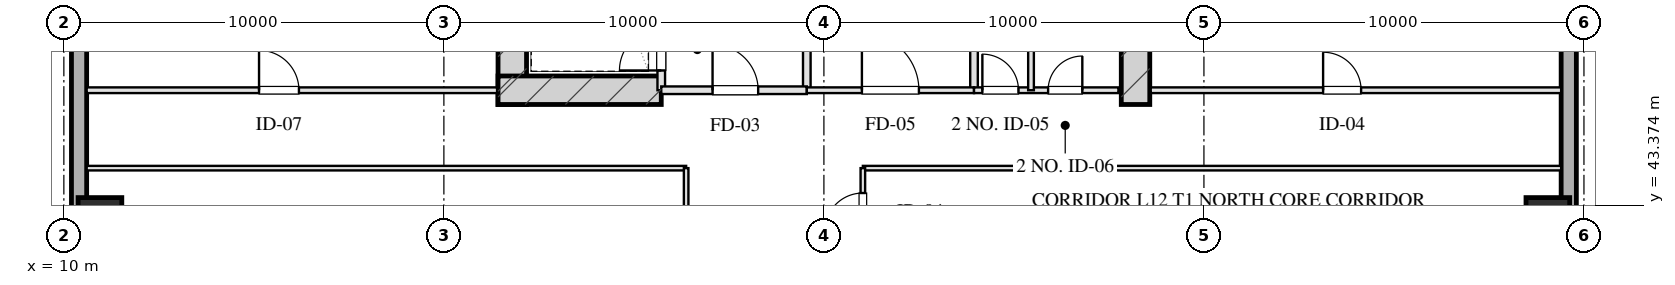
"""IFC4 building model, lengths in metres.
Left out: names, types, materials, properties, quantities, classifications, styles, units other than length and angle.
Written with IfcOpenShell. Run it as: python <this file> out.ifc"""

import sys

from ifc_helpers import new_model, si_unit, direction, frame, frame_2d, origin, origin_2d, place, context, subcontext, project, spatial, rectangle, hollow_rectangle, extrude, element, fill, save


model = new_model("IFC4")
c1 = context("Model", 3, precision=1e-05, world=origin(), true_north=direction((0.0, 1.0)))
c2 = subcontext(c1, "Body", "Model", "MODEL_VIEW")
j1 = project(units=[si_unit("LENGTHUNIT", "METRE"), si_unit("PLANEANGLEUNIT", "RADIAN")], contexts=[c1])
p1 = place(None, origin())
s1 = spatial("IfcSite", under=j1, at=p1, CompositionType="ELEMENT")
p2 = place(p1, origin())
s2 = spatial("IfcBuilding", under=s1, at=p2, CompositionType="ELEMENT")
p3 = place(p2, frame((0.0, 0.0, 54.05)))
s3 = spatial("IfcBuildingStorey", under=s2, at=p3, CompositionType="ELEMENT", Elevation=54.05)
for number, where, z_axis, x_axis in (
    (1, (21.8, 46.025, 0.0), (0.0, 0.0, 1.0), (0.0, 1.0, 0.0)),
    (2, (38.2, 46.025, 0.0), (0.0, 0.0, 1.0), (0.0, 1.0, 0.0)),
):
    element("IfcWall", number, at=place(p3, frame(where, z_axis=z_axis, x_axis=x_axis)), inside=s3, PredefinedType="SHEAR", context=c2, shape_type="SweptSolid", body=[
        extrude(rectangle(XDim=9.63, YDim=0.75, at=frame_2d((4.815, 0.0))), origin(), (0.0, 0.0, 1.0), 3.45),
    ])
p4 = place(p3, frame((21.425, 46.4, 0.0), z_axis=(0.0, 0.0, 1.0), x_axis=(1.0, 0.0, 0.0)))
e3 = element("IfcWall", 3, at=p4, inside=s3, PredefinedType="SHEAR", context=c2, shape_type="SweptSolid", body=[
    extrude(rectangle(XDim=4.295, YDim=0.75, at=frame_2d((2.147, 0.0))), origin(), (0.0, 0.0, 1.0), 3.45),
])
for number, where, z_axis, x_axis in (
    (4, (10.95, 43.0, 0.0), (0.0, 0.0, 1.0), (1.0, 0.0, 0.0)),
    (5, (49.05, 43.0, 0.0), (0.0, 0.0, 1.0), (1.0, 0.0, 0.0)),
):
    element("IfcColumn", number, at=place(p3, frame(where, z_axis=z_axis, x_axis=x_axis)), inside=s3, PredefinedType="COLUMN", context=c2, shape_type="SweptSolid", body=[
        extrude(hollow_rectangle(XDim=1.15, YDim=1.15, WallThickness=0.04, at=origin_2d()), origin(), (0.0, 0.0, 1.0), 3.451),
    ])
p5 = place(p3, frame((10.4, 7.2, 0.0), z_axis=(0.0, 0.0, 1.0), x_axis=(0.0, 1.0, 0.0)))
e6 = element("IfcWall", 6, at=p5, inside=s3, PredefinedType="SOLIDWALL", context=c2, shape_type="SweptSolid", body=[
    extrude(rectangle(XDim=53.6, YDim=0.4, at=frame_2d((26.8, 0.0))), origin(), (0.0, 0.0, 1.0), 2.61),
])
p6 = place(p5, frame((19.15, 0.0, 0.75)))
e7 = element("IfcOpeningElement", 7, at=p6, cuts=e6, PredefinedType="OPENING", context=c2, shape_type="SweptSolid", body=[
    extrude(rectangle(XDim=2.5, YDim=1.46, at=frame_2d((1.25, 0.73))), frame((0.0, 0.21, 0.0), z_axis=(0.0, -1.0, 0.0), x_axis=(1.0, 0.0, 0.0)), (0.0, 0.0, 1.0), 0.42),
])
p7 = place(p5, frame((22.95, 0.0, 0.75)))
e8 = element("IfcOpeningElement", 8, at=p7, cuts=e6, PredefinedType="OPENING", context=c2, shape_type="SweptSolid", body=[
    extrude(rectangle(XDim=2.5, YDim=1.46, at=frame_2d((1.25, 0.73))), frame((0.0, 0.21, 0.0), z_axis=(0.0, -1.0, 0.0), x_axis=(1.0, 0.0, 0.0)), (0.0, 0.0, 1.0), 0.42),
])
p8 = place(p5, frame((31.95, 0.0, 0.75)))
e9 = element("IfcOpeningElement", 9, at=p8, cuts=e6, PredefinedType="OPENING", context=c2, shape_type="SweptSolid", body=[
    extrude(rectangle(XDim=2.5, YDim=1.46, at=frame_2d((1.25, 0.73))), frame((0.0, 0.21, 0.0), z_axis=(0.0, -1.0, 0.0), x_axis=(1.0, 0.0, 0.0)), (0.0, 0.0, 1.0), 0.42),
])
p9 = place(p3, frame((49.6, 60.8, 0.0), z_axis=(0.0, 0.0, 1.0), x_axis=(0.0, -1.0, 0.0)))
e10 = element("IfcWall", 10, at=p9, inside=s3, PredefinedType="SOLIDWALL", context=c2, shape_type="SweptSolid", body=[
    extrude(rectangle(XDim=53.6, YDim=0.4, at=frame_2d((26.8, 0.0))), origin(), (0.0, 0.0, 1.0), 2.61),
])
p10 = place(p3, frame((25.72, 46.4, 0.0), z_axis=(0.0, 0.0, 1.0), x_axis=(0.0, 1.0, 0.0)))
e11 = element("IfcWall", 11, at=p10, inside=s3, PredefinedType="PARTITIONING", context=c2, shape_type="SweptSolid", body=[
    extrude(rectangle(XDim=1.9, YDim=0.2, at=frame_2d((0.95, 0.0))), origin(), (0.0, 0.0, 1.0), 3.175),
])
p11 = place(p10, frame((0.52, 0.0, 0.0)))
e12 = element("IfcOpeningElement", 12, at=p11, cuts=e11, PredefinedType="OPENING", context=c2, shape_type="SweptSolid", body=[
    extrude(rectangle(XDim=1.1, YDim=2.05, at=frame_2d((0.55, 1.025))), frame((0.0, 0.11, 0.0), z_axis=(0.0, -1.0, 0.0), x_axis=(1.0, 0.0, 0.0)), (0.0, 0.0, 1.0), 0.22),
])
p12 = place(p3, frame((29.55, 46.4, 0.0), z_axis=(0.0, 0.0, 1.0), x_axis=(0.0, 1.0, 0.0)))
e13 = element("IfcWall", 13, at=p12, inside=s3, PredefinedType="PARTITIONING", context=c2, shape_type="SweptSolid", body=[
    extrude(rectangle(XDim=8.43, YDim=0.2, at=frame_2d((4.215, 0.0))), origin(), (0.0, 0.0, 1.0), 3.175),
])
p13 = place(p3, frame((25.72, 46.4, 0.0), z_axis=(0.0, 0.0, 1.0), x_axis=(1.0, 0.0, 0.0)))
e14 = element("IfcWall", 14, at=p13, inside=s3, PredefinedType="PARTITIONING", context=c2, shape_type="SweptSolid", body=[
    extrude(rectangle(XDim=3.83, YDim=0.2, at=frame_2d((1.915, 0.0))), origin(), (0.0, 0.0, 1.0), 3.175),
])
p14 = place(p13, frame((1.35, 0.0, 0.0)))
e15 = element("IfcOpeningElement", 15, at=p14, cuts=e14, PredefinedType="OPENING", context=c2, shape_type="SweptSolid", body=[
    extrude(rectangle(XDim=1.2, YDim=2.05, at=frame_2d((0.6, 1.025))), frame((0.0, 0.11, 0.0), z_axis=(0.0, -1.0, 0.0), x_axis=(1.0, 0.0, 0.0)), (0.0, 0.0, 1.0), 0.22),
])
p15 = place(p3, frame((33.95, 46.4, 0.0), z_axis=(0.0, 0.0, 1.0), x_axis=(0.0, 1.0, 0.0)))
e16 = element("IfcWall", 16, at=p15, inside=s3, PredefinedType="PARTITIONING", context=c2, shape_type="SweptSolid", body=[
    extrude(rectangle(XDim=8.43, YDim=0.2, at=frame_2d((4.215, 0.0))), origin(), (0.0, 0.0, 1.0), 3.175),
])
p16 = place(p3, frame((29.55, 46.4, 0.0), z_axis=(0.0, 0.0, 1.0), x_axis=(1.0, 0.0, 0.0)))
e17 = element("IfcWall", 17, at=p16, inside=s3, PredefinedType="PARTITIONING", context=c2, shape_type="SweptSolid", body=[
    extrude(rectangle(XDim=4.4, YDim=0.15, at=frame_2d((2.2, 0.0))), origin(), (0.0, 0.0, 1.0), 3.175),
])
p17 = place(p16, frame((1.45, 0.0, 0.0)))
e18 = element("IfcOpeningElement", 18, at=p17, cuts=e17, PredefinedType="OPENING", context=c2, shape_type="SweptSolid", body=[
    extrude(rectangle(XDim=1.5, YDim=2.05, at=frame_2d((0.75, 1.025))), frame((0.0, 0.085, 0.0), z_axis=(0.0, -1.0, 0.0), x_axis=(1.0, 0.0, 0.0)), (0.0, 0.0, 1.0), 0.17),
])
p18 = place(p3, frame((33.95, 46.4, 0.0), z_axis=(0.0, 0.0, 1.0), x_axis=(1.0, 0.0, 0.0)))
e19 = element("IfcWall", 19, at=p18, inside=s3, PredefinedType="PARTITIONING", context=c2, shape_type="SweptSolid", body=[
    extrude(rectangle(XDim=3.8, YDim=0.15, at=frame_2d((1.9, 0.0))), origin(), (0.0, 0.0, 1.0), 3.175),
])
p19 = place(p18, frame((0.22, 0.0, 0.0)))
e20 = element("IfcOpeningElement", 20, at=p19, cuts=e19, PredefinedType="OPENING", context=c2, shape_type="SweptSolid", body=[
    extrude(rectangle(XDim=0.95, YDim=2.05, at=frame_2d((0.475, 1.025))), frame((0.0, 0.085, 0.0), z_axis=(0.0, -1.0, 0.0), x_axis=(1.0, 0.0, 0.0)), (0.0, 0.0, 1.0), 0.17),
])
p20 = place(p18, frame((1.95, 0.0, 0.0)))
e21 = element("IfcOpeningElement", 21, at=p20, cuts=e19, PredefinedType="OPENING", context=c2, shape_type="SweptSolid", body=[
    extrude(rectangle(XDim=0.9, YDim=2.05, at=frame_2d((0.45, 1.025))), frame((0.0, 0.085, 0.0), z_axis=(0.0, -1.0, 0.0), x_axis=(1.0, 0.0, 0.0)), (0.0, 0.0, 1.0), 0.17),
])
p21 = place(p3, frame((35.45, 46.4, 0.0), z_axis=(0.0, 0.0, 1.0), x_axis=(0.0, 1.0, 0.0)))
e22 = element("IfcWall", 22, at=p21, inside=s3, PredefinedType="PARTITIONING", context=c2, shape_type="SweptSolid", body=[
    extrude(rectangle(XDim=8.43, YDim=0.15, at=frame_2d((4.215, 0.0))), origin(), (0.0, 0.0, 1.0), 2.765),
])
p22 = place(p21, frame((2.55, 0.0, 0.0)))
e23 = element("IfcOpeningElement", 23, at=p22, cuts=e22, PredefinedType="OPENING", context=c2, shape_type="SweptSolid", body=[
    extrude(rectangle(XDim=0.95, YDim=2.05, at=frame_2d((0.475, 1.025))), frame((0.0, 0.085, 0.0), z_axis=(0.0, -1.0, 0.0), x_axis=(1.0, 0.0, 0.0)), (0.0, 0.0, 1.0), 0.17),
])
p23 = place(p21, frame((5.6, 0.0, 0.0)))
e24 = element("IfcOpeningElement", 24, at=p23, cuts=e22, PredefinedType="OPENING", context=c2, shape_type="SweptSolid", body=[
    extrude(rectangle(XDim=0.9, YDim=2.05, at=frame_2d((0.45, 1.025))), frame((0.0, 0.085, 0.0), z_axis=(0.0, -1.0, 0.0), x_axis=(1.0, 0.0, 0.0)), (0.0, 0.0, 1.0), 0.17),
])
p24 = place(p3, frame((10.6, 46.4, 0.0), z_axis=(0.0, 0.0, 1.0), x_axis=(1.0, 0.0, 0.0)))
e25 = element("IfcWall", 25, at=p24, inside=s3, PredefinedType="PARTITIONING", context=c2, shape_type="SweptSolid", body=[
    extrude(rectangle(XDim=10.8, YDim=0.15, at=frame_2d((5.4, 0.0))), origin(), (0.0, 0.0, 1.0), 3.175),
])
p25 = place(p24, frame((4.536, 0.0, 0.0)))
e26 = element("IfcOpeningElement", 26, at=p25, cuts=e25, PredefinedType="OPENING", context=c2, shape_type="SweptSolid", body=[
    extrude(rectangle(XDim=1.05, YDim=2.05, at=frame_2d((0.525, 1.025))), frame((0.0, 0.085, 0.0), z_axis=(0.0, -1.0, 0.0), x_axis=(1.0, 0.0, 0.0)), (0.0, 0.0, 1.0), 0.17),
])
p26 = place(p3, frame((38.6, 46.4, 0.0), z_axis=(0.0, 0.0, 1.0), x_axis=(1.0, 0.0, 0.0)))
e27 = element("IfcWall", 27, at=p26, inside=s3, PredefinedType="PARTITIONING", context=c2, shape_type="SweptSolid", body=[
    extrude(rectangle(XDim=10.8, YDim=0.15, at=frame_2d((5.4, 0.0))), origin(), (0.0, 0.0, 1.0), 3.175),
])
p27 = place(p26, frame((4.536, 0.0, 0.0)))
e28 = element("IfcOpeningElement", 28, at=p27, cuts=e27, PredefinedType="OPENING", context=c2, shape_type="SweptSolid", body=[
    extrude(rectangle(XDim=1.0, YDim=2.05, at=frame_2d((0.5, 1.025))), frame((0.0, 0.085, 0.0), z_axis=(0.0, -1.0, 0.0), x_axis=(1.0, 0.0, 0.0)), (0.0, 0.0, 1.0), 0.17),
])
p28 = place(p3, frame((10.6, 44.35, 0.0), z_axis=(0.0, 0.0, 1.0), x_axis=(1.0, 0.0, 0.0)))
e29 = element("IfcWall", 29, at=p28, inside=s3, PredefinedType="PARTITIONING", context=c2, shape_type="SweptSolid", body=[
    extrude(rectangle(XDim=15.775, YDim=0.12, at=frame_2d((7.887, 0.0))), origin(), (0.0, 0.0, 1.0), 3.175),
])
p29 = place(p3, frame((31.025, 44.35, 0.0), z_axis=(0.0, 0.0, 1.0), x_axis=(1.0, 0.0, 0.0)))
e30 = element("IfcWall", 30, at=p29, inside=s3, PredefinedType="PARTITIONING", context=c2, shape_type="SweptSolid", body=[
    extrude(rectangle(XDim=18.375, YDim=0.12, at=frame_2d((9.188, 0.0))), origin(), (0.0, 0.0, 1.0), 3.175),
])
p30 = place(p3, frame((26.375, 23.65, 0.0), z_axis=(0.0, 0.0, 1.0), x_axis=(0.0, 1.0, 0.0)))
e31 = element("IfcWall", 31, at=p30, inside=s3, PredefinedType="PARTITIONING", context=c2, shape_type="SweptSolid", body=[
    extrude(rectangle(XDim=20.7, YDim=0.12, at=frame_2d((10.35, 0.0))), origin(), (0.0, 0.0, 1.0), 3.175),
])
p31 = place(p30, frame((2.518, 0.0, 0.0)))
e32 = element("IfcOpeningElement", 32, at=p31, cuts=e31, PredefinedType="OPENING", context=c2, shape_type="SweptSolid", body=[
    extrude(rectangle(XDim=0.85, YDim=2.05, at=frame_2d((0.425, 1.025))), frame((0.0, 0.07, 0.0), z_axis=(0.0, -1.0, 0.0), x_axis=(1.0, 0.0, 0.0)), (0.0, 0.0, 1.0), 0.14),
])
p32 = place(p30, frame((9.692, 0.0, 0.0)))
e33 = element("IfcOpeningElement", 33, at=p32, cuts=e31, PredefinedType="OPENING", context=c2, shape_type="SweptSolid", body=[
    extrude(rectangle(XDim=1.0, YDim=2.05, at=frame_2d((0.5, 1.025))), frame((0.0, 0.07, 0.0), z_axis=(0.0, -1.0, 0.0), x_axis=(1.0, 0.0, 0.0)), (0.0, 0.0, 1.0), 0.14),
])
p33 = place(p30, frame((17.025, 0.0, 0.0)))
e34 = element("IfcOpeningElement", 34, at=p33, cuts=e31, PredefinedType="OPENING", context=c2, shape_type="SweptSolid", body=[
    extrude(rectangle(XDim=1.0, YDim=2.05, at=frame_2d((0.5, 1.025))), frame((0.0, 0.07, 0.0), z_axis=(0.0, -1.0, 0.0), x_axis=(1.0, 0.0, 0.0)), (0.0, 0.0, 1.0), 0.14),
])
p34 = place(p3, frame((31.025, 23.65, 0.0), z_axis=(0.0, 0.0, 1.0), x_axis=(0.0, 1.0, 0.0)))
e35 = element("IfcWall", 35, at=p34, inside=s3, PredefinedType="PARTITIONING", context=c2, shape_type="SweptSolid", body=[
    extrude(rectangle(XDim=20.7, YDim=0.12, at=frame_2d((10.35, 0.0))), origin(), (0.0, 0.0, 1.0), 3.175),
])
p35 = place(p34, frame((0.775, 0.0, 0.0)))
e36 = element("IfcOpeningElement", 36, at=p35, cuts=e35, PredefinedType="OPENING", context=c2, shape_type="SweptSolid", body=[
    extrude(rectangle(XDim=1.0, YDim=2.05, at=frame_2d((0.5, 1.025))), frame((0.0, 0.07, 0.0), z_axis=(0.0, -1.0, 0.0), x_axis=(1.0, 0.0, 0.0)), (0.0, 0.0, 1.0), 0.14),
])
p36 = place(p34, frame((3.95, 0.0, 0.0)))
e37 = element("IfcOpeningElement", 37, at=p36, cuts=e35, PredefinedType="OPENING", context=c2, shape_type="SweptSolid", body=[
    extrude(rectangle(XDim=1.0, YDim=2.05, at=frame_2d((0.5, 1.025))), frame((0.0, 0.07, 0.0), z_axis=(0.0, -1.0, 0.0), x_axis=(1.0, 0.0, 0.0)), (0.0, 0.0, 1.0), 0.14),
])
p37 = place(p34, frame((8.455, 0.0, 0.0)))
e38 = element("IfcOpeningElement", 38, at=p37, cuts=e35, PredefinedType="OPENING", context=c2, shape_type="SweptSolid", body=[
    extrude(rectangle(XDim=1.05, YDim=2.05, at=frame_2d((0.525, 1.025))), frame((0.0, 0.07, 0.0), z_axis=(0.0, -1.0, 0.0), x_axis=(1.0, 0.0, 0.0)), (0.0, 0.0, 1.0), 0.14),
])
p38 = place(p34, frame((12.923, 0.0, 0.0)))
e39 = element("IfcOpeningElement", 39, at=p38, cuts=e35, PredefinedType="OPENING", context=c2, shape_type="SweptSolid", body=[
    extrude(rectangle(XDim=1.0, YDim=2.05, at=frame_2d((0.5, 1.025))), frame((0.0, 0.07, 0.0), z_axis=(0.0, -1.0, 0.0), x_axis=(1.0, 0.0, 0.0)), (0.0, 0.0, 1.0), 0.14),
])
p39 = place(p34, frame((16.338, 0.0, 0.0)))
e40 = element("IfcOpeningElement", 40, at=p39, cuts=e35, PredefinedType="OPENING", context=c2, shape_type="SweptSolid", body=[
    extrude(rectangle(XDim=1.0, YDim=2.05, at=frame_2d((0.5, 1.025))), frame((0.0, 0.07, 0.0), z_axis=(0.0, -1.0, 0.0), x_axis=(1.0, 0.0, 0.0)), (0.0, 0.0, 1.0), 0.14),
])
p40 = place(p34, frame((19.045, 0.0, 0.0)))
e41 = element("IfcOpeningElement", 41, at=p40, cuts=e35, PredefinedType="OPENING", context=c2, shape_type="SweptSolid", body=[
    extrude(rectangle(XDim=1.0, YDim=2.05, at=frame_2d((0.5, 1.025))), frame((0.0, 0.07, 0.0), z_axis=(0.0, -1.0, 0.0), x_axis=(1.0, 0.0, 0.0)), (0.0, 0.0, 1.0), 0.14),
])
p41 = place(p11, origin())
e42 = element("IfcDoor", 42, at=p41, inside=s3, OperationType="SINGLE_SWING_LEFT", PredefinedType="DOOR", context=c2, shape_type="SweptSolid", body=[
    extrude(rectangle(XDim=1.1, YDim=2.05, at=frame_2d((0.55, 1.025))), frame((0.0, 0.025, 0.0), z_axis=(0.0, -1.0, 0.0), x_axis=(1.0, 0.0, 0.0)), (0.0, 0.0, 1.0), 0.05),
])
fill(e12, e42)
p42 = place(p14, origin())
e43 = element("IfcDoor", 43, at=p42, inside=s3, OperationType="SINGLE_SWING_LEFT", PredefinedType="DOOR", context=c2, shape_type="SweptSolid", body=[
    extrude(rectangle(XDim=1.2, YDim=2.05, at=frame_2d((0.6, 1.025))), frame((0.0, 0.025, 0.0), z_axis=(0.0, -1.0, 0.0), x_axis=(1.0, 0.0, 0.0)), (0.0, 0.0, 1.0), 0.05),
])
fill(e15, e43)
p43 = place(p17, origin())
e44 = element("IfcDoor", 44, at=p43, inside=s3, OperationType="SINGLE_SWING_LEFT", PredefinedType="DOOR", context=c2, shape_type="SweptSolid", body=[
    extrude(rectangle(XDim=1.5, YDim=2.05, at=frame_2d((0.75, 1.025))), frame((0.0, 0.025, 0.0), z_axis=(0.0, -1.0, 0.0), x_axis=(1.0, 0.0, 0.0)), (0.0, 0.0, 1.0), 0.05),
])
fill(e18, e44)
p44 = place(p19, origin())
e45 = element("IfcDoor", 45, at=p44, inside=s3, OperationType="SINGLE_SWING_LEFT", PredefinedType="DOOR", context=c2, shape_type="SweptSolid", body=[
    extrude(rectangle(XDim=0.95, YDim=2.05, at=frame_2d((0.475, 1.025))), frame((0.0, 0.025, 0.0), z_axis=(0.0, -1.0, 0.0), x_axis=(1.0, 0.0, 0.0)), (0.0, 0.0, 1.0), 0.05),
])
fill(e20, e45)
p45 = place(p20, origin())
e46 = element("IfcDoor", 46, at=p45, inside=s3, OperationType="SINGLE_SWING_RIGHT", PredefinedType="DOOR", context=c2, shape_type="SweptSolid", body=[
    extrude(rectangle(XDim=0.9, YDim=2.05, at=frame_2d((0.45, 1.025))), frame((0.0, 0.025, 0.0), z_axis=(0.0, -1.0, 0.0), x_axis=(1.0, 0.0, 0.0)), (0.0, 0.0, 1.0), 0.05),
])
fill(e21, e46)
p46 = place(p25, origin())
e47 = element("IfcDoor", 47, at=p46, inside=s3, OperationType="SINGLE_SWING_LEFT", PredefinedType="DOOR", context=c2, shape_type="SweptSolid", body=[
    extrude(rectangle(XDim=1.05, YDim=2.05, at=frame_2d((0.525, 1.025))), frame((0.0, 0.025, 0.0), z_axis=(0.0, -1.0, 0.0), x_axis=(1.0, 0.0, 0.0)), (0.0, 0.0, 1.0), 0.05),
])
fill(e26, e47)
p47 = place(p27, origin())
e48 = element("IfcDoor", 48, at=p47, inside=s3, OperationType="SINGLE_SWING_LEFT", PredefinedType="DOOR", context=c2, shape_type="SweptSolid", body=[
    extrude(rectangle(XDim=1.0, YDim=2.05, at=frame_2d((0.5, 1.025))), frame((0.0, 0.025, 0.0), z_axis=(0.0, -1.0, 0.0), x_axis=(1.0, 0.0, 0.0)), (0.0, 0.0, 1.0), 0.05),
])
fill(e28, e48)
p48 = place(p40, origin())
e49 = element("IfcDoor", 49, at=p48, inside=s3, OperationType="SINGLE_SWING_LEFT", PredefinedType="DOOR", context=c2, shape_type="SweptSolid", body=[
    extrude(rectangle(XDim=1.0, YDim=2.05, at=frame_2d((0.5, 1.025))), frame((0.0, 0.025, 0.0), z_axis=(0.0, -1.0, 0.0), x_axis=(1.0, 0.0, 0.0)), (0.0, 0.0, 1.0), 0.05),
])
fill(e41, e49)
save(model, sys.argv[1])
